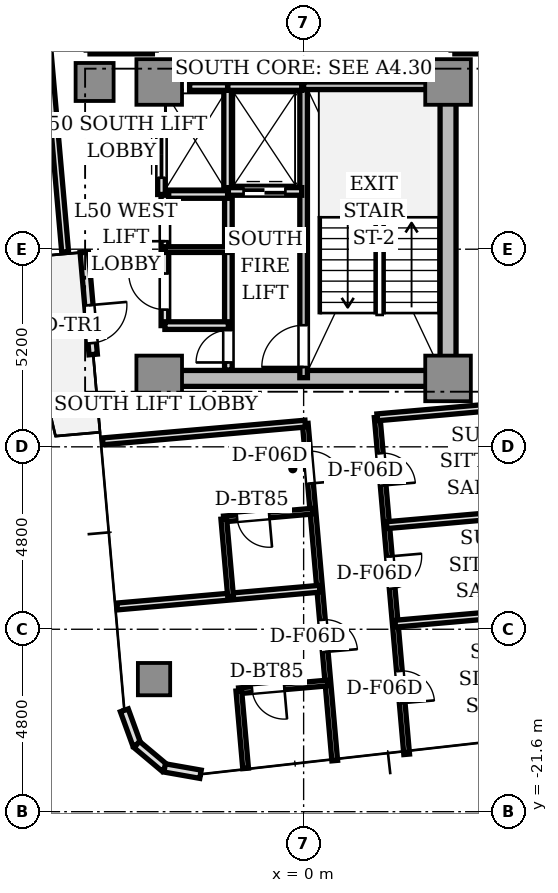
"""IFC4 building model, lengths in metres.
Left out: names, types, materials, properties, quantities, classifications, styles, units other than length and angle.
Written with IfcOpenShell. Run it as: python <this file> out.ifc"""

import sys

from ifc_helpers import new_model, si_unit, direction, frame, frame_2d, origin, origin_2d, place, context, subcontext, project, spatial, rectangle, extrude, source, transform, mapped, element, fill, save


model = new_model("IFC4")
c1 = context("Model", 3, precision=1e-05, world=origin(), true_north=direction((0.0, 1.0)))
c2 = subcontext(c1, "Body", "Model", "MODEL_VIEW")
j1 = project(units=[si_unit("LENGTHUNIT", "METRE"), si_unit("PLANEANGLEUNIT", "RADIAN")], contexts=[c1])
p1 = place(None, origin())
s1 = spatial("IfcSite", under=j1, at=p1, CompositionType="ELEMENT")
p2 = place(p1, origin())
s2 = spatial("IfcBuilding", under=s1, at=p2, CompositionType="ELEMENT")
p3 = place(p2, frame((0.0, 0.0, 181.9)))
s3 = spatial("IfcBuildingStorey", under=s2, at=p3, CompositionType="ELEMENT", Elevation=181.9)
p4 = place(p3, frame((-3.55, -10.2, 0.0), z_axis=(0.0, 0.0, 1.0), x_axis=(1.0, 0.0, 0.0)))
e1 = element("IfcWall", 1, at=p4, inside=s3, PredefinedType="SHEAR", context=c2, shape_type="SweptSolid", body=[
    extrude(rectangle(XDim=7.1, YDim=0.42, at=frame_2d((3.55, 0.0))), origin(), (0.0, 0.0, 1.0), 3.11),
])
p5 = place(p3, frame((3.8, -9.75, 0.0), z_axis=(0.0, 0.0, 1.0), x_axis=(0.0, 1.0, 0.0)))
e2 = element("IfcWall", 2, at=p5, inside=s3, PredefinedType="SHEAR", context=c2, shape_type="SweptSolid", body=[
    extrude(rectangle(XDim=6.9, YDim=0.42, at=frame_2d((3.45, 0.0))), origin(), (0.0, 0.0, 1.0), 3.11),
])
m1 = source(origin(), c2, "Body", "SweptSolid", [
    extrude(rectangle(XDim=1.2, YDim=1.2, at=origin_2d()), origin(), (0.0, 0.0, 1.0), 3.11),
])
for number, where, z_axis, x_axis in (
    (3, (-3.8, -2.4, 0.0), (0.0, 0.0, 1.0), (1.0, 0.0, 0.0)),
    (4, (3.8, -2.4, 0.0), (0.0, 0.0, 1.0), (1.0, 0.0, 0.0)),
    (5, (-3.8, -10.2, 0.0), (0.0, 0.0, 1.0), (1.0, 0.0, 0.0)),
    (6, (3.8, -10.2, 0.0), (0.0, 0.0, 1.0), (1.0, 0.0, 0.0)),
):
    element("IfcColumn", number, at=place(p3, frame(where, z_axis=z_axis, x_axis=x_axis)), inside=s3, PredefinedType="COLUMN", context=c2, shape_type="MappedRepresentation", body=[
        mapped(m1, transform((0.0, 0.0, 0.0), scale=1.0)),
    ])
m2 = source(origin(), c2, "Body", "SweptSolid", [
    extrude(rectangle(XDim=1.0, YDim=1.0, at=origin_2d()), origin(), (0.0, 0.0, 1.0), 3.11),
])
p6 = place(p3, frame((-5.5, -2.4, 0.0), z_axis=(0.0, 0.0, 1.0), x_axis=(1.0, 0.0, 0.0)))
e7 = element("IfcColumn", 7, at=p6, inside=s3, PredefinedType="COLUMN", context=c2, shape_type="MappedRepresentation", body=[
    mapped(m2, transform((0.0, 0.0, 0.0), scale=1.0)),
])
m3 = source(origin(), c2, "Body", "SweptSolid", [
    extrude(rectangle(XDim=0.85, YDim=0.85, at=origin_2d()), origin(), (0.0, 0.0, 1.0), 3.11),
])
p7 = place(p3, frame((-3.936, -18.112, 0.0), z_axis=(0.0, 0.0, 1.0), x_axis=(1.0, 0.0, 0.0)))
e8 = element("IfcColumn", 8, at=p7, inside=s3, PredefinedType="COLUMN", context=c2, shape_type="MappedRepresentation", body=[
    mapped(m3, transform((0.0, 0.0, 0.0), scale=1.0)),
])
p8 = place(p3, frame((-5.772, -6.879, 0.0), z_axis=(0.0, 0.0, 1.0), x_axis=(0.087168071984, -0.996193619346, 0.0)))
e9 = element("IfcWall", 9, at=p8, inside=s3, PredefinedType="STANDARD", context=c2, shape_type="SweptSolid", body=[
    extrude(rectangle(XDim=2.7, YDim=0.22, at=frame_2d((1.35, 0.0))), origin(), (0.0, 0.0, 1.0), 3.11),
])
p9 = place(p8, frame((1.4, 0.0, 0.0)))
e10 = element("IfcOpeningElement", 10, at=p9, cuts=e9, PredefinedType="OPENING", context=c2, shape_type="SweptSolid", body=[
    extrude(rectangle(XDim=1.0, YDim=2.2, at=frame_2d((0.5, 1.1))), frame((0.0, 0.12, 0.0), z_axis=(0.0, -1.0, 0.0), x_axis=(1.0, 0.0, 0.0)), (0.0, 0.0, 1.0), 0.24),
])
p10 = place(p3, frame((-4.718, -18.933, 0.0), z_axis=(0.0, 0.0, 1.0), x_axis=(0.34188635151, -0.939741306239, 0.0)))
e11 = element("IfcWall", 11, at=p10, inside=s3, PredefinedType="STANDARD", context=c2, shape_type="SweptSolid", body=[
    extrude(rectangle(XDim=0.958, YDim=0.22, at=frame_2d((0.479, 0.0))), origin(), (0.0, 0.0, 1.0), 3.11),
])
for number, where, z_axis, x_axis in (
    (12, (-4.39, -19.833, 0.0), (0.0, 0.0, 1.0), (0.766, -0.643, 0.0)),
    (13, (-3.657, -20.449, 0.0), (0.0, 0.0, 1.0), (0.985, -0.174, 0.0)),
):
    element("IfcWall", number, at=place(p3, frame(where, z_axis=z_axis, x_axis=x_axis)), inside=s3, PredefinedType="STANDARD", context=c2, shape_type="SweptSolid", body=[
        extrude(rectangle(XDim=0.958, YDim=0.22, at=frame_2d((0.479, 0.0))), origin(), (0.0, 0.0, 1.0), 3.11),
    ])
p11 = place(p3, frame((0.0, -10.18, 0.0), z_axis=(0.0, 0.0, 1.0), x_axis=(0.0, 1.0, 0.0)))
e14 = element("IfcWall", 14, at=p11, inside=s3, PredefinedType="SOLIDWALL", context=c2, shape_type="SweptSolid", body=[
    extrude(rectangle(XDim=7.68, YDim=0.2, at=frame_2d((3.84, 0.0))), origin(), (0.0, 0.0, 1.0), 3.11),
])
p12 = place(p11, frame((0.28, 0.0, 0.0)))
e15 = element("IfcOpeningElement", 15, at=p12, cuts=e14, PredefinedType="OPENING", context=c2, shape_type="SweptSolid", body=[
    extrude(rectangle(XDim=1.1, YDim=2.15, at=frame_2d((0.55, 1.075))), frame((0.0, 0.11, 0.0), z_axis=(0.0, -1.0, 0.0), x_axis=(1.0, 0.0, 0.0)), (0.0, 0.0, 1.0), 0.22),
])
p13 = place(p3, frame((0.0, -2.5, 0.0), z_axis=(0.0, 0.0, 1.0), x_axis=(1.0, 0.0, 0.0)))
e16 = element("IfcWall", 16, at=p13, inside=s3, PredefinedType="SOLIDWALL", context=c2, shape_type="SweptSolid", body=[
    extrude(rectangle(XDim=3.72, YDim=0.2, at=frame_2d((1.86, 0.0))), origin(), (0.0, 0.0, 1.0), 3.11),
])
p14 = place(p3, frame((-1.98, -9.98, 0.0), z_axis=(0.0, 0.0, 1.0), x_axis=(0.0, 1.0, 0.0)))
e17 = element("IfcWall", 17, at=p14, inside=s3, PredefinedType="SOLIDWALL", context=c2, shape_type="SweptSolid", body=[
    extrude(rectangle(XDim=4.66, YDim=0.2, at=frame_2d((2.33, 0.0))), origin(), (0.0, 0.0, 1.0), 2.66),
])
p15 = place(p14, frame((0.2, 0.0, 0.0)))
e18 = element("IfcOpeningElement", 18, at=p15, cuts=e17, PredefinedType="OPENING", context=c2, shape_type="SweptSolid", body=[
    extrude(rectangle(XDim=0.85, YDim=2.1, at=frame_2d((0.425, 1.05))), frame((0.0, 0.11, 0.0), z_axis=(0.0, -1.0, 0.0), x_axis=(1.0, 0.0, 0.0)), (0.0, 0.0, 1.0), 0.22),
])
p16 = place(p3, frame((-2.0, -5.28, 0.0), z_axis=(0.0, 0.0, 1.0), x_axis=(0.0, 1.0, 0.0)))
e19 = element("IfcWall", 19, at=p16, inside=s3, PredefinedType="SOLIDWALL", context=c2, shape_type="SweptSolid", body=[
    extrude(rectangle(XDim=2.78, YDim=0.2, at=frame_2d((1.39, 0.0))), origin(), (0.0, 0.0, 1.0), 2.66),
])
p17 = place(p3, frame((-2.0, -2.52, 0.0), z_axis=(0.0, 0.0, 1.0), x_axis=(1.0, 0.0, 0.0)))
e20 = element("IfcWall", 20, at=p17, inside=s3, PredefinedType="SOLIDWALL", context=c2, shape_type="SweptSolid", body=[
    extrude(rectangle(XDim=1.95, YDim=0.2, at=frame_2d((0.975, 0.0))), origin(), (0.0, 0.0, 1.0), 2.66),
])
p18 = place(p3, frame((-1.98, -5.28, 0.0), z_axis=(0.0, 0.0, 1.0), x_axis=(1.0, 0.0, 0.0)))
e21 = element("IfcWall", 21, at=p18, inside=s3, PredefinedType="SOLIDWALL", context=c2, shape_type="SweptSolid", body=[
    extrude(rectangle(XDim=1.93, YDim=0.2, at=frame_2d((0.965, 0.0))), origin(), (0.0, 0.0, 1.0), 2.66),
])
p19 = place(p18, frame((0.4, 0.0, 0.0)))
e22 = element("IfcOpeningElement", 22, at=p19, cuts=e21, PredefinedType="OPENING", context=c2, shape_type="SweptSolid", body=[
    extrude(rectangle(XDim=1.1, YDim=2.2, at=frame_2d((0.55, 1.1))), frame((0.0, 0.11, 0.0), z_axis=(0.0, -1.0, 0.0), x_axis=(1.0, 0.0, 0.0)), (0.0, 0.0, 1.0), 0.22),
])
p20 = place(p3, frame((-3.0, -2.52, 0.0), z_axis=(0.0, 0.0, 1.0), x_axis=(1.0, 0.0, 0.0)))
e23 = element("IfcWall", 23, at=p20, inside=s3, PredefinedType="SOLIDWALL", context=c2, shape_type="SweptSolid", body=[
    extrude(rectangle(XDim=1.0, YDim=0.2, at=frame_2d((0.5, 0.0))), origin(), (0.0, 0.0, 1.0), 2.66),
])
p21 = place(p3, frame((-3.74, -5.36, 0.0), z_axis=(0.0, 0.0, 1.0), x_axis=(1.0, 0.0, 0.0)))
e24 = element("IfcWall", 24, at=p21, inside=s3, PredefinedType="SOLIDWALL", context=c2, shape_type="SweptSolid", body=[
    extrude(rectangle(XDim=1.74, YDim=0.2, at=frame_2d((0.87, 0.0))), origin(), (0.0, 0.0, 1.0), 2.66),
])
p22 = place(p3, frame((-3.74, -5.36, 0.0), z_axis=(0.0, 0.0, 1.0), x_axis=(0.0, 1.0, 0.0)))
e25 = element("IfcWall", 25, at=p22, inside=s3, PredefinedType="SOLIDWALL", context=c2, shape_type="SweptSolid", body=[
    extrude(rectangle(XDim=2.08, YDim=0.2, at=frame_2d((1.04, 0.0))), origin(), (0.0, 0.0, 1.0), 2.66),
])
p23 = place(p22, frame((0.44, 0.0, 0.0)))
e26 = element("IfcOpeningElement", 26, at=p23, cuts=e25, PredefinedType="OPENING", context=c2, shape_type="SweptSolid", body=[
    extrude(rectangle(XDim=1.2, YDim=2.2, at=frame_2d((0.6, 1.1))), frame((0.0, 0.11, 0.0), z_axis=(0.0, -1.0, 0.0), x_axis=(1.0, 0.0, 0.0)), (0.0, 0.0, 1.0), 0.22),
])
for number, where, z_axis, x_axis in (
    (27, (3.98, -1.56, 0.0), (0.0, 0.0, 1.0), (1.0, 0.0, 0.0)),
    (28, (-5.62, -1.56, 0.0), (0.0, 0.0, 1.0), (1.0, 0.0, 0.0)),
):
    element("IfcWall", number, at=place(p3, frame(where, z_axis=z_axis, x_axis=x_axis)), inside=s3, PredefinedType="SOLIDWALL", context=c2, shape_type="SweptSolid", body=[
        extrude(rectangle(XDim=1.64, YDim=0.2, at=frame_2d((0.82, 0.0))), origin(), (0.0, 0.0, 1.0), 2.66),
    ])
p24 = place(p3, frame((-3.65, -8.81, 0.0), z_axis=(0.0, 0.0, 1.0), x_axis=(0.0, 1.0, 0.0)))
e29 = element("IfcWall", 29, at=p24, inside=s3, PredefinedType="SOLIDWALL", context=c2, shape_type="SweptSolid", body=[
    extrude(rectangle(XDim=3.43, YDim=0.2, at=frame_2d((1.715, 0.0))), origin(), (0.0, 0.0, 1.0), 2.66),
])
p25 = place(p24, frame((0.42, 0.0, 0.0)))
e30 = element("IfcOpeningElement", 30, at=p25, cuts=e29, PredefinedType="OPENING", context=c2, shape_type="SweptSolid", body=[
    extrude(rectangle(XDim=0.95, YDim=2.15, at=frame_2d((0.475, 1.075))), frame((0.0, 0.11, 0.0), z_axis=(0.0, -1.0, 0.0), x_axis=(1.0, 0.0, 0.0)), (0.0, 0.0, 1.0), 0.22),
])
p26 = place(p24, frame((2.22, 0.0, 0.0)))
e31 = element("IfcOpeningElement", 31, at=p26, cuts=e29, PredefinedType="OPENING", context=c2, shape_type="SweptSolid", body=[
    extrude(rectangle(XDim=0.85, YDim=2.1, at=frame_2d((0.425, 1.05))), frame((0.0, 0.11, 0.0), z_axis=(0.0, -1.0, 0.0), x_axis=(1.0, 0.0, 0.0)), (0.0, 0.0, 1.0), 0.22),
])
p27 = place(p3, frame((-3.65, -8.81, 0.0), z_axis=(0.0, 0.0, 1.0), x_axis=(1.0, 0.0, 0.0)))
e32 = element("IfcWall", 32, at=p27, inside=s3, PredefinedType="SOLIDWALL", context=c2, shape_type="SweptSolid", body=[
    extrude(rectangle(XDim=1.67, YDim=0.2, at=frame_2d((0.835, 0.0))), origin(), (0.0, 0.0, 1.0), 2.66),
])
p28 = place(p3, frame((-3.65, -6.81, 0.0), z_axis=(0.0, 0.0, 1.0), x_axis=(1.0, 0.0, 0.0)))
e33 = element("IfcWall", 33, at=p28, inside=s3, PredefinedType="PARTITIONING", context=c2, shape_type="SweptSolid", body=[
    extrude(rectangle(XDim=1.67, YDim=0.15, at=frame_2d((0.835, 0.0))), origin(), (0.0, 0.0, 1.0), 2.66),
])
p29 = place(p3, frame((-6.741, -1.543, 0.0), z_axis=(0.0, 0.0, 1.0), x_axis=(0.087161289348, -0.996194212812, 0.0)))
e34 = element("IfcWall", 34, at=p29, inside=s3, PredefinedType="PARTITIONING", context=c2, shape_type="SweptSolid", body=[
    extrude(rectangle(XDim=5.35, YDim=0.18, at=frame_2d((2.675, 0.0))), origin(), (0.0, 0.0, 1.0), 2.66),
])
p30 = place(p3, frame((1.936, -11.224, 0.0), z_axis=(0.0, 0.0, 1.0), x_axis=(0.087151636982, -0.996195057291, 0.0)))
e35 = element("IfcWall", 35, at=p30, inside=s3, PredefinedType="PARTITIONING", context=c2, shape_type="SweptSolid", body=[
    extrude(rectangle(XDim=8.9, YDim=0.15, at=frame_2d((4.45, 0.0))), origin(), (0.0, 0.0, 1.0), 2.66),
])
p31 = place(p30, frame((0.949, 0.0, 0.0)))
e36 = element("IfcOpeningElement", 36, at=p31, cuts=e35, PredefinedType="OPENING", context=c2, shape_type="SweptSolid", body=[
    extrude(rectangle(XDim=0.85, YDim=2.1, at=frame_2d((0.425, 1.05))), frame((0.0, 0.085, 0.0), z_axis=(0.0, -1.0, 0.0), x_axis=(1.0, 0.0, 0.0)), (0.0, 0.0, 1.0), 0.17),
])
p32 = place(p30, frame((3.674, 0.0, 0.0)))
e37 = element("IfcOpeningElement", 37, at=p32, cuts=e35, PredefinedType="OPENING", context=c2, shape_type="SweptSolid", body=[
    extrude(rectangle(XDim=0.85, YDim=2.1, at=frame_2d((0.425, 1.05))), frame((0.0, 0.085, 0.0), z_axis=(0.0, -1.0, 0.0), x_axis=(1.0, 0.0, 0.0)), (0.0, 0.0, 1.0), 0.17),
])
p33 = place(p30, frame((6.7, 0.0, 0.0)))
e38 = element("IfcOpeningElement", 38, at=p33, cuts=e35, PredefinedType="OPENING", context=c2, shape_type="SweptSolid", body=[
    extrude(rectangle(XDim=0.85, YDim=2.1, at=frame_2d((0.425, 1.05))), frame((0.0, 0.085, 0.0), z_axis=(0.0, -1.0, 0.0), x_axis=(1.0, 0.0, 0.0)), (0.0, 0.0, 1.0), 0.17),
])
p34 = place(p3, frame((0.043, -11.39, 0.0), z_axis=(0.0, 0.0, 1.0), x_axis=(0.087178860582, -0.996192675273, 0.0)))
e39 = element("IfcWall", 39, at=p34, inside=s3, PredefinedType="PARTITIONING", context=c2, shape_type="SweptSolid", body=[
    extrude(rectangle(XDim=8.9, YDim=0.15, at=frame_2d((4.45, 0.0))), origin(), (0.0, 0.0, 1.0), 2.66),
])
p35 = place(p34, frame((0.73, 0.0, 0.0)))
e40 = element("IfcOpeningElement", 40, at=p35, cuts=e39, PredefinedType="OPENING", context=c2, shape_type="SweptSolid", body=[
    extrude(rectangle(XDim=0.85, YDim=2.1, at=frame_2d((0.425, 1.05))), frame((0.0, 0.085, 0.0), z_axis=(0.0, -1.0, 0.0), x_axis=(1.0, 0.0, 0.0)), (0.0, 0.0, 1.0), 0.17),
])
p36 = place(p34, frame((5.181, 0.0, 0.0)))
e41 = element("IfcOpeningElement", 41, at=p36, cuts=e39, PredefinedType="OPENING", context=c2, shape_type="SweptSolid", body=[
    extrude(rectangle(XDim=0.85, YDim=2.1, at=frame_2d((0.425, 1.05))), frame((0.0, 0.085, 0.0), z_axis=(0.0, -1.0, 0.0), x_axis=(1.0, 0.0, 0.0)), (0.0, 0.0, 1.0), 0.17),
])
for number, where, z_axis, x_axis in (
    (42, (1.936, -11.224, 0.0), (0.0, 0.0, 1.0), (0.996, 0.087, 0.0)),
    (43, (-5.287, -11.856, 0.0), (0.0, 0.0, 1.0), (0.996, 0.087, 0.0)),
    (44, (2.184, -14.061, 0.0), (0.0, 0.0, 1.0), (0.996, 0.087, 0.0)),
    (45, (2.411, -16.653, 0.0), (0.0, 0.0, 1.0), (0.996, 0.087, 0.0)),
    (46, (0.423, -15.734, 0.0), (0.0, 0.0, 1.0), (-0.996, -0.087, 0.0)),
):
    element("IfcWall", number, at=place(p3, frame(where, z_axis=z_axis, x_axis=x_axis)), inside=s3, PredefinedType="PARTITIONING", context=c2, shape_type="SweptSolid", body=[
        extrude(rectangle(XDim=5.35, YDim=0.18, at=frame_2d((2.675, 0.0))), origin(), (0.0, 0.0, 1.0), 2.66),
    ])
p37 = place(p3, frame((0.244, -13.692, 0.0), z_axis=(0.0, 0.0, 1.0), x_axis=(-0.996197656711, -0.087121918963, 0.0)))
e47 = element("IfcWall", 47, at=p37, inside=s3, PredefinedType="PARTITIONING", context=c2, shape_type="SweptSolid", body=[
    extrude(rectangle(XDim=2.354, YDim=0.15, at=frame_2d((1.177, 0.0))), origin(), (0.0, 0.0, 1.0), 2.66),
])
p38 = place(p37, frame((1.154, 0.0, 0.0)))
e48 = element("IfcOpeningElement", 48, at=p38, cuts=e47, PredefinedType="OPENING", context=c2, shape_type="SweptSolid", body=[
    extrude(rectangle(XDim=0.85, YDim=2.1, at=frame_2d((0.425, 1.05))), frame((0.0, 0.085, 0.0), z_axis=(0.0, -1.0, 0.0), x_axis=(1.0, 0.0, 0.0)), (0.0, 0.0, 1.0), 0.17),
])
p39 = place(p3, frame((-2.101, -13.897, 0.0), z_axis=(0.0, 0.0, 1.0), x_axis=(0.087174336889, -0.99619307114, 0.0)))
e49 = element("IfcWall", 49, at=p39, inside=s3, PredefinedType="PARTITIONING", context=c2, shape_type="SweptSolid", body=[
    extrude(rectangle(XDim=2.05, YDim=0.15, at=frame_2d((1.025, 0.0))), origin(), (0.0, 0.0, 1.0), 2.66),
])
p40 = place(p3, frame((0.64, -18.213, 0.0), z_axis=(0.0, 0.0, 1.0), x_axis=(-0.996188649846, -0.087224846905, 0.0)))
e50 = element("IfcWall", 50, at=p40, inside=s3, PredefinedType="PARTITIONING", context=c2, shape_type="SweptSolid", body=[
    extrude(rectangle(XDim=2.354, YDim=0.15, at=frame_2d((1.177, 0.0))), origin(), (0.0, 0.0, 1.0), 2.66),
])
p41 = place(p40, frame((1.154, 0.0, 0.0)))
e51 = element("IfcOpeningElement", 51, at=p41, cuts=e50, PredefinedType="OPENING", context=c2, shape_type="SweptSolid", body=[
    extrude(rectangle(XDim=0.85, YDim=2.1, at=frame_2d((0.425, 1.05))), frame((0.0, 0.085, 0.0), z_axis=(0.0, -1.0, 0.0), x_axis=(1.0, 0.0, 0.0)), (0.0, 0.0, 1.0), 0.17),
])
p42 = place(p3, frame((-1.705, -18.419, 0.0), z_axis=(0.0, 0.0, 1.0), x_axis=(0.087056149438, -0.996203406361, 0.0)))
e52 = element("IfcWall", 52, at=p42, inside=s3, PredefinedType="PARTITIONING", context=c2, shape_type="SweptSolid", body=[
    extrude(rectangle(XDim=2.05, YDim=0.15, at=frame_2d((1.025, 0.0))), origin(), (0.0, 0.0, 1.0), 2.66),
])
m4 = source(origin(), c2, "Body", "SweptSolid", [
    extrude(rectangle(XDim=1.0, YDim=0.05, at=origin_2d()), origin(), (0.0, 0.0, 1.0), 2.2),
])
p43 = place(p9, frame((0.5, 0.0, 0.0)))
e53 = element("IfcDoor", 53, at=p43, inside=s3, OperationType="SINGLE_SWING_LEFT", PredefinedType="DOOR", context=c2, shape_type="MappedRepresentation", body=[
    mapped(m4, transform((0.0, 0.0, 0.0), scale=1.0)),
])
fill(e10, e53)
m5 = source(origin(), c2, "Body", "SweptSolid", [
    extrude(rectangle(XDim=1.1, YDim=0.05, at=origin_2d()), origin(), (0.0, 0.0, 1.0), 2.15),
])
p44 = place(p12, frame((0.55, 0.0, 0.0)))
e54 = element("IfcDoor", 54, at=p44, inside=s3, OperationType="SINGLE_SWING_LEFT", PredefinedType="DOOR", context=c2, shape_type="MappedRepresentation", body=[
    mapped(m5, transform((0.0, 0.0, 0.0), scale=1.0)),
])
fill(e15, e54)
m6 = source(origin(), c2, "Body", "SweptSolid", [
    extrude(rectangle(XDim=0.85, YDim=0.05, at=origin_2d()), origin(), (0.0, 0.0, 1.0), 2.1),
])
p45 = place(p15, frame((0.425, 0.0, 0.0)))
e55 = element("IfcDoor", 55, at=p45, inside=s3, OperationType="SINGLE_SWING_LEFT", PredefinedType="DOOR", context=c2, shape_type="MappedRepresentation", body=[
    mapped(m6, transform((0.0, 0.0, 0.0), scale=1.0)),
])
fill(e18, e55)
m7 = source(origin(), c2, "Body", "SweptSolid", [
    extrude(rectangle(XDim=1.1, YDim=0.05, at=origin_2d()), origin(), (0.0, 0.0, 1.0), 2.2),
])
p46 = place(p19, frame((0.55, 0.0, 0.0)))
e56 = element("IfcDoor", 56, at=p46, inside=s3, OperationType="DOUBLE_DOOR_SLIDING", PredefinedType="DOOR", context=c2, shape_type="MappedRepresentation", body=[
    mapped(m7, transform((0.0, 0.0, 0.0), scale=1.0)),
])
fill(e22, e56)
m8 = source(origin(), c2, "Body", "SweptSolid", [
    extrude(rectangle(XDim=1.2, YDim=0.05, at=origin_2d()), origin(), (0.0, 0.0, 1.0), 2.2),
])
p47 = place(p23, frame((0.6, 0.0, 0.0)))
e57 = element("IfcDoor", 57, at=p47, inside=s3, OperationType="DOUBLE_DOOR_SLIDING", PredefinedType="DOOR", context=c2, shape_type="MappedRepresentation", body=[
    mapped(m8, transform((0.0, 0.0, 0.0), scale=1.0)),
])
fill(e26, e57)
m9 = source(origin(), c2, "Body", "SweptSolid", [
    extrude(rectangle(XDim=0.95, YDim=0.05, at=origin_2d()), origin(), (0.0, 0.0, 1.0), 2.15),
])
p48 = place(p25, frame((0.475, 0.0, 0.0)))
e58 = element("IfcDoor", 58, at=p48, inside=s3, OperationType="SINGLE_SWING_RIGHT", PredefinedType="DOOR", context=c2, shape_type="MappedRepresentation", body=[
    mapped(m9, transform((0.0, 0.0, 0.0), scale=1.0)),
])
fill(e30, e58)
p49 = place(p26, frame((0.425, 0.0, 0.0)))
e59 = element("IfcDoor", 59, at=p49, inside=s3, OperationType="SINGLE_SWING_LEFT", PredefinedType="DOOR", context=c2, shape_type="MappedRepresentation", body=[
    mapped(m6, transform((0.0, 0.0, 0.0), scale=1.0)),
])
fill(e31, e59)
p50 = place(p31, frame((0.425, 0.0, 0.0)))
e60 = element("IfcDoor", 60, at=p50, inside=s3, OperationType="SINGLE_SWING_RIGHT", PredefinedType="DOOR", context=c2, shape_type="MappedRepresentation", body=[
    mapped(m6, transform((0.0, 0.0, 0.0), scale=1.0)),
])
fill(e36, e60)
p51 = place(p32, frame((0.425, 0.0, 0.0)))
e61 = element("IfcDoor", 61, at=p51, inside=s3, OperationType="SINGLE_SWING_LEFT", PredefinedType="DOOR", context=c2, shape_type="MappedRepresentation", body=[
    mapped(m6, transform((0.0, 0.0, 0.0), scale=1.0)),
])
fill(e37, e61)
p52 = place(p33, frame((0.425, 0.0, 0.0)))
e62 = element("IfcDoor", 62, at=p52, inside=s3, OperationType="SINGLE_SWING_RIGHT", PredefinedType="DOOR", context=c2, shape_type="MappedRepresentation", body=[
    mapped(m6, transform((0.0, 0.0, 0.0), scale=1.0)),
])
fill(e38, e62)
p53 = place(p38, frame((0.425, 0.0, 0.0)))
e63 = element("IfcDoor", 63, at=p53, inside=s3, OperationType="SINGLE_SWING_LEFT", PredefinedType="DOOR", context=c2, shape_type="MappedRepresentation", body=[
    mapped(m6, transform((0.0, 0.0, 0.0), scale=1.0)),
])
fill(e48, e63)
p54 = place(p35, frame((0.425, 0.0, 0.0)))
e64 = element("IfcDoor", 64, at=p54, inside=s3, OperationType="SINGLE_SWING_RIGHT", PredefinedType="DOOR", context=c2, shape_type="MappedRepresentation", body=[
    mapped(m6, transform((0.0, 0.0, 0.0), scale=1.0)),
])
fill(e40, e64)
p55 = place(p41, frame((0.425, 0.0, 0.0)))
e65 = element("IfcDoor", 65, at=p55, inside=s3, OperationType="SINGLE_SWING_LEFT", PredefinedType="DOOR", context=c2, shape_type="MappedRepresentation", body=[
    mapped(m6, transform((0.0, 0.0, 0.0), scale=1.0)),
])
fill(e51, e65)
p56 = place(p36, frame((0.425, 0.0, 0.0)))
e66 = element("IfcDoor", 66, at=p56, inside=s3, OperationType="SINGLE_SWING_RIGHT", PredefinedType="DOOR", context=c2, shape_type="MappedRepresentation", body=[
    mapped(m6, transform((0.0, 0.0, 0.0), scale=1.0)),
])
fill(e41, e66)
save(model, sys.argv[1])
